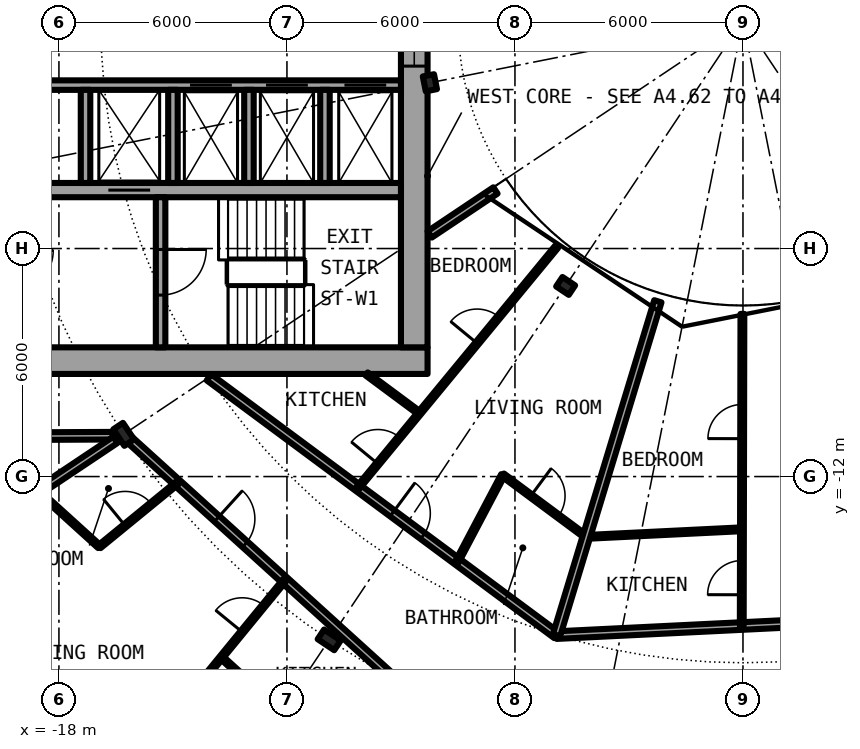
"""IFC4 building model, lengths in metres.
Left out: names, types, materials, properties, quantities, classifications, styles, units other than length and angle.
Written with IfcOpenShell. Run it as: python <this file> out.ifc"""

import sys

from ifc_helpers import new_model, si_unit, direction, frame, frame_2d, origin, origin_2d, place, context, subcontext, project, spatial, rectangle, i_section, extrude, element, fill, save


model = new_model("IFC4")
c1 = context("Model", 3, precision=1e-05, world=origin(), true_north=direction((0.0, 1.0)))
c2 = subcontext(c1, "Body", "Model", "MODEL_VIEW")
j1 = project(units=[si_unit("LENGTHUNIT", "METRE"), si_unit("PLANEANGLEUNIT", "RADIAN")], contexts=[c1])
p1 = place(None, origin())
s1 = spatial("IfcSite", under=j1, at=p1, CompositionType="ELEMENT")
p2 = place(p1, origin())
s2 = spatial("IfcBuilding", under=s1, at=p2, CompositionType="ELEMENT")
p3 = place(p2, frame((0.0, 0.0, 81.9)))
s3 = spatial("IfcBuildingStorey", under=s2, at=p3, CompositionType="ELEMENT", Elevation=81.9)
for number, where, z_axis, x_axis in (
    (1, (-16.297, -10.889, 0.0), (0.0, 0.0, 1.0), (-0.831, -0.556, 0.0)),
    (2, (-10.889, -16.297, 0.0), (0.0, 0.0, 1.0), (-0.556, -0.831, 0.0)),
):
    element("IfcColumn", number, at=place(p3, frame(where, z_axis=z_axis, x_axis=x_axis)), inside=s3, PredefinedType="COLUMN", context=c2, shape_type="SweptSolid", body=[
        extrude(i_section(OverallWidth=0.306, OverallDepth=0.524, WebThickness=0.021, FlangeThickness=0.04, FilletRadius=0.027, at=origin_2d()), origin(), (0.0, 0.0, 1.0), 3.05),
    ])
for number, where, z_axis, x_axis in (
    (3, (-8.239, -1.639, 0.0), (0.0, 0.0, 1.0), (-0.981, -0.195, 0.0)),
    (4, (-4.667, -6.984, 0.0), (0.0, 0.0, 1.0), (-0.556, -0.831, 0.0)),
):
    element("IfcColumn", number, at=place(p3, frame(where, z_axis=z_axis, x_axis=x_axis)), inside=s3, PredefinedType="COLUMN", context=c2, shape_type="SweptSolid", body=[
        extrude(i_section(OverallWidth=0.3, OverallDepth=0.4, WebThickness=0.013, FlangeThickness=0.024, FilletRadius=0.027, at=origin_2d()), origin(), (0.0, 0.0, 1.0), 3.05),
    ])
p4 = place(p3, frame((-22.3, -8.95, 0.0), z_axis=(0.0, 0.0, 1.0), x_axis=(1.0, 0.0, 0.0)))
e5 = element("IfcWall", 5, at=p4, inside=s3, PredefinedType="SHEAR", context=c2, shape_type="SweptSolid", body=[
    extrude(rectangle(XDim=14.0, YDim=0.7, at=frame_2d((7.0, 0.0))), origin(), (0.0, 0.0, 1.0), 3.05),
])
p5 = place(p4, frame((1.225, 0.0, 0.0)))
e6 = element("IfcOpeningElement", 6, at=p5, cuts=e5, PredefinedType="OPENING", context=c2, shape_type="SweptSolid", body=[
    extrude(rectangle(XDim=1.2, YDim=2.3, at=frame_2d((0.6, 1.15))), frame((0.0, 0.36, 0.0), z_axis=(0.0, -1.0, 0.0), x_axis=(1.0, 0.0, 0.0)), (0.0, 0.0, 1.0), 0.72),
])
p6 = place(p3, frame((-8.65, 8.6, 0.0), z_axis=(0.0, 0.0, 1.0), x_axis=(0.0, -1.0, 0.0)))
e7 = element("IfcWall", 7, at=p6, inside=s3, PredefinedType="SHEAR", context=c2, shape_type="SweptSolid", body=[
    extrude(rectangle(XDim=17.2, YDim=0.7, at=frame_2d((8.6, 0.0))), origin(), (0.0, 0.0, 1.0), 3.05),
])
p7 = place(p6, frame((7.4, 0.0, 0.1)))
e8 = element("IfcOpeningElement", 8, at=p7, cuts=e7, PredefinedType="OPENING", context=c2, shape_type="SweptSolid", body=[
    extrude(rectangle(XDim=2.4, YDim=2.2, at=frame_2d((1.2, 1.1))), frame((0.0, 0.36, 0.0), z_axis=(0.0, -1.0, 0.0), x_axis=(1.0, 0.0, 0.0)), (0.0, 0.0, 1.0), 0.72),
])
p8 = place(p3, frame((-9.0, -1.7, 0.0), z_axis=(0.0, 0.0, 1.0), x_axis=(-1.0, 0.0, 0.0)))
e9 = element("IfcWall", 9, at=p8, inside=s3, PredefinedType="SHEAR", context=c2, shape_type="SweptSolid", body=[
    extrude(rectangle(XDim=10.15, YDim=0.25, at=frame_2d((5.075, 0.0))), origin(), (0.0, 0.0, 1.0), 3.05),
])
p9 = place(p8, frame((0.387, 0.0, 0.0)))
e10 = element("IfcOpeningElement", 10, at=p9, cuts=e9, PredefinedType="OPENING", context=c2, shape_type="SweptSolid", body=[
    extrude(rectangle(XDim=1.1, YDim=2.3, at=frame_2d((0.55, 1.15))), frame((0.0, 0.135, 0.0), z_axis=(0.0, -1.0, 0.0), x_axis=(1.0, 0.0, 0.0)), (0.0, 0.0, 1.0), 0.27),
])
p10 = place(p8, frame((2.45, 0.0, 0.0)))
e11 = element("IfcOpeningElement", 11, at=p10, cuts=e9, PredefinedType="OPENING", context=c2, shape_type="SweptSolid", body=[
    extrude(rectangle(XDim=1.1, YDim=2.3, at=frame_2d((0.55, 1.15))), frame((0.0, 0.135, 0.0), z_axis=(0.0, -1.0, 0.0), x_axis=(1.0, 0.0, 0.0)), (0.0, 0.0, 1.0), 0.27),
])
p11 = place(p8, frame((4.45, 0.0, 0.0)))
e12 = element("IfcOpeningElement", 12, at=p11, cuts=e9, PredefinedType="OPENING", context=c2, shape_type="SweptSolid", body=[
    extrude(rectangle(XDim=1.1, YDim=2.3, at=frame_2d((0.55, 1.15))), frame((0.0, 0.135, 0.0), z_axis=(0.0, -1.0, 0.0), x_axis=(1.0, 0.0, 0.0)), (0.0, 0.0, 1.0), 0.27),
])
p12 = place(p3, frame((-9.0, -4.462, 0.0), z_axis=(0.0, 0.0, 1.0), x_axis=(-1.0, 0.0, 0.0)))
e13 = element("IfcWall", 13, at=p12, inside=s3, PredefinedType="SHEAR", context=c2, shape_type="SweptSolid", body=[
    extrude(rectangle(XDim=10.15, YDim=0.375, at=frame_2d((5.075, 0.0))), origin(), (0.0, 0.0, 1.0), 3.05),
])
p13 = place(p12, frame((6.6, 0.0, 0.0)))
e14 = element("IfcOpeningElement", 14, at=p13, cuts=e13, PredefinedType="OPENING", context=c2, shape_type="SweptSolid", body=[
    extrude(rectangle(XDim=1.1, YDim=2.3, at=frame_2d((0.55, 1.15))), frame((0.0, 0.198, 0.0), z_axis=(0.0, -1.0, 0.0), x_axis=(1.0, 0.0, 0.0)), (0.0, 0.0, 1.0), 0.395),
])
p14 = place(p3, frame((-15.325, -4.65, 0.0), z_axis=(0.0, 0.0, 1.0), x_axis=(0.0, -1.0, 0.0)))
e15 = element("IfcWall", 15, at=p14, inside=s3, PredefinedType="SHEAR", context=c2, shape_type="SweptSolid", body=[
    extrude(rectangle(XDim=3.95, YDim=0.25, at=frame_2d((1.975, 0.0))), origin(), (0.0, 0.0, 1.0), 3.05),
])
p15 = place(p14, frame((1.375, 0.0, 0.0)))
e16 = element("IfcOpeningElement", 16, at=p15, cuts=e15, PredefinedType="OPENING", context=c2, shape_type="SweptSolid", body=[
    extrude(rectangle(XDim=1.2, YDim=2.3, at=frame_2d((0.6, 1.15))), frame((0.0, 0.135, 0.0), z_axis=(0.0, -1.0, 0.0), x_axis=(1.0, 0.0, 0.0)), (0.0, 0.0, 1.0), 0.27),
])
for number, where, z_axis, x_axis in (
    (17, (-15.0, -1.825, 0.0), (0.0, 0.0, 1.0), (0.0, -1.0, 0.0)),
    (18, (-17.3, -1.825, 0.0), (0.0, 0.0, 1.0), (0.0, -1.0, 0.0)),
    (19, (-11.0, -1.825, 0.0), (0.0, 0.0, 1.0), (0.0, -1.0, 0.0)),
    (20, (-13.0, -1.825, 0.0), (0.0, 0.0, 1.0), (0.0, -1.0, 0.0)),
):
    element("IfcWall", number, at=place(p3, frame(where, z_axis=z_axis, x_axis=x_axis)), inside=s3, PredefinedType="SOLIDWALL", context=c2, shape_type="SweptSolid", body=[
        extrude(rectangle(XDim=2.45, YDim=0.25, at=frame_2d((1.225, 0.0))), origin(), (0.0, 0.0, 1.0), 2.7),
    ])
p16 = place(p3, frame((-18.542, -12.389, 0.0), z_axis=(0.0, 0.0, 1.0), x_axis=(0.740836325503, -0.671685595212, 0.0)))
e21 = element("IfcWall", 21, at=p16, inside=s3, PredefinedType="PARTITIONING", context=c2, shape_type="SweptSolid", body=[
    extrude(rectangle(XDim=2.168, YDim=0.1, at=frame_2d((1.084, 0.0))), origin(), (0.0, 0.0, 1.0), 2.7),
])
p17 = place(p3, frame((-13.727, -16.754, 0.0), z_axis=(0.0, 0.0, 1.0), x_axis=(0.740840803797, -0.671680655839, 0.0)))
e22 = element("IfcWall", 22, at=p17, inside=s3, PredefinedType="PARTITIONING", context=c2, shape_type="SweptSolid", body=[
    extrude(rectangle(XDim=4.338, YDim=0.1, at=frame_2d((2.169, 0.0))), origin(), (0.0, 0.0, 1.0), 2.7),
])
p18 = place(p3, frame((-16.179, -10.995, 0.0), z_axis=(0.0, 0.0, 1.0), x_axis=(0.740909940942, -0.671604392044, 0.0)))
e23 = element("IfcWall", 23, at=p18, inside=s3, PredefinedType="PARTITIONING", context=c2, shape_type="SweptSolid", body=[
    extrude(rectangle(XDim=9.367, YDim=0.2, at=frame_2d((4.683, 0.0))), origin(), (0.0, 0.0, 1.0), 2.38),
])
p19 = place(p18, frame((3.152, 0.0, 0.0)))
e24 = element("IfcOpeningElement", 24, at=p19, cuts=e23, PredefinedType="OPENING", context=c2, shape_type="SweptSolid", body=[
    extrude(rectangle(XDim=1.0, YDim=2.3, at=frame_2d((0.5, 1.15))), frame((0.0, 0.11, 0.0), z_axis=(0.0, -1.0, 0.0), x_axis=(1.0, 0.0, 0.0)), (0.0, 0.0, 1.0), 0.22),
])
p20 = place(p3, frame((-14.052, -9.389, 0.0), z_axis=(0.0, 0.0, 1.0), x_axis=(0.803204584823, -0.59570327758, 0.0)))
e25 = element("IfcWall", 25, at=p20, inside=s3, PredefinedType="PARTITIONING", context=c2, shape_type="SweptSolid", body=[
    extrude(rectangle(XDim=11.387, YDim=0.2, at=frame_2d((5.693, 0.0))), origin(), (0.0, 0.0, 1.0), 2.7),
])
p21 = place(p20, frame((6.007, 0.0, 0.0)))
e26 = element("IfcOpeningElement", 26, at=p21, cuts=e25, PredefinedType="OPENING", context=c2, shape_type="SweptSolid", body=[
    extrude(rectangle(XDim=1.0, YDim=2.3, at=frame_2d((0.5, 1.15))), frame((0.0, 0.11, 0.0), z_axis=(0.0, -1.0, 0.0), x_axis=(1.0, 0.0, 0.0)), (0.0, 0.0, 1.0), 0.22),
])
p22 = place(p3, frame((-4.906, -16.172, 0.0), z_axis=(0.0, 0.0, 1.0), x_axis=(0.998798520108, 0.049005267363, 0.0)))
e27 = element("IfcWall", 27, at=p22, inside=s3, PredefinedType="PARTITIONING", context=c2, shape_type="SweptSolid", body=[
    extrude(rectangle(XDim=11.389, YDim=0.2, at=frame_2d((5.694, 0.0))), origin(), (0.0, 0.0, 1.0), 2.7),
])
p23 = place(p22, frame((6.008, 0.0, 0.0)))
e28 = element("IfcOpeningElement", 28, at=p23, cuts=e27, PredefinedType="OPENING", context=c2, shape_type="SweptSolid", body=[
    extrude(rectangle(XDim=1.0, YDim=2.3, at=frame_2d((0.5, 1.15))), frame((0.0, 0.11, 0.0), z_axis=(0.0, -1.0, 0.0), x_axis=(1.0, 0.0, 0.0)), (0.0, 0.0, 1.0), 0.22),
])
p24 = place(p3, frame((-9.904, -9.3, 0.0), z_axis=(0.0, 0.0, 1.0), x_axis=(0.803135014325, -0.595797070121, 0.0)))
e29 = element("IfcWall", 29, at=p24, inside=s3, PredefinedType="PARTITIONING", context=c2, shape_type="SweptSolid", body=[
    extrude(rectangle(XDim=1.732, YDim=0.1, at=frame_2d((0.866, 0.0))), origin(), (0.0, 0.0, 1.0), 2.7),
])
p25 = place(p3, frame((-6.319, -11.96, 0.0), z_axis=(0.0, 0.0, 1.0), x_axis=(0.803128348509, -0.595806055542, 0.0)))
e30 = element("IfcWall", 30, at=p25, inside=s3, PredefinedType="PARTITIONING", context=c2, shape_type="SweptSolid", body=[
    extrude(rectangle(XDim=2.734, YDim=0.1, at=frame_2d((1.367, 0.0))), origin(), (0.0, 0.0, 1.0), 2.7),
])
p26 = place(p25, frame((0.918, 0.0, 0.0)))
e31 = element("IfcOpeningElement", 31, at=p26, cuts=e30, PredefinedType="OPENING", context=c2, shape_type="SweptSolid", body=[
    extrude(rectangle(XDim=0.9, YDim=2.3, at=frame_2d((0.45, 1.15))), frame((0.0, 0.06, 0.0), z_axis=(0.0, -1.0, 0.0), x_axis=(1.0, 0.0, 0.0)), (0.0, 0.0, 1.0), 0.12),
])
p27 = place(p3, frame((-4.125, -13.588, 0.0), z_axis=(0.0, 0.0, 1.0), x_axis=(0.998798386358, 0.049007993321, 0.0)))
e32 = element("IfcWall", 32, at=p27, inside=s3, PredefinedType="PARTITIONING", context=c2, shape_type="SweptSolid", body=[
    extrude(rectangle(XDim=4.1, YDim=0.1, at=frame_2d((2.05, 0.0))), origin(), (0.0, 0.0, 1.0), 2.7),
])
p28 = place(p3, frame((-21.675, -10.95, 0.0), z_axis=(0.0, 0.0, 1.0), x_axis=(0.999988019025, 0.004895079807, 0.0)))
e33 = element("IfcWall", 33, at=p28, inside=s3, PredefinedType="PARTITIONING", context=c2, shape_type="SweptSolid", body=[
    extrude(rectangle(XDim=5.087, YDim=0.2, at=frame_2d((2.543, 0.0))), origin(), (0.0, 0.0, 1.0), 2.7),
])
p29 = place(p28, frame((2.163, 0.0, 0.0)))
e34 = element("IfcOpeningElement", 34, at=p29, cuts=e33, PredefinedType="OPENING", context=c2, shape_type="SweptSolid", body=[
    extrude(rectangle(XDim=1.0, YDim=2.3, at=frame_2d((0.5, 1.15))), frame((0.0, 0.11, 0.0), z_axis=(0.0, -1.0, 0.0), x_axis=(1.0, 0.0, 0.0)), (0.0, 0.0, 1.0), 0.22),
])
p30 = place(p3, frame((-6.513, -4.472, 0.0), z_axis=(0.0, 0.0, 1.0), x_axis=(-0.831382204863, -0.555701025225, 0.0)))
e35 = element("IfcWall", 35, at=p30, inside=s3, PredefinedType="PARTITIONING", context=c2, shape_type="SweptSolid", body=[
    extrude(rectangle(XDim=2.082, YDim=0.2, at=frame_2d((1.041, 0.0))), origin(), (0.0, 0.0, 1.0), 2.7),
])
p31 = place(p3, frame((-22.595, -15.097, 0.0), z_axis=(0.0, 0.0, 1.0), x_axis=(0.831505405283, 0.555516661303, 0.0)))
e36 = element("IfcWall", 36, at=p31, inside=s3, PredefinedType="PARTITIONING", context=c2, shape_type="SweptSolid", body=[
    extrude(rectangle(XDim=7.312, YDim=0.2, at=frame_2d((3.656, 0.0))), origin(), (0.0, 0.0, 1.0), 2.7),
])
p32 = place(p3, frame((-17.219, -21.023, 0.0), z_axis=(0.0, 0.0, 1.0), x_axis=(0.633664062855, 0.773608334654, 0.0)))
e37 = element("IfcWall", 37, at=p32, inside=s3, PredefinedType="PARTITIONING", context=c2, shape_type="SweptSolid", body=[
    extrude(rectangle(XDim=8.138, YDim=0.1, at=frame_2d((4.069, 0.0))), origin(), (0.0, 0.0, 1.0), 2.7),
])
p33 = place(p32, frame((6.377, 0.0, 0.0)))
e38 = element("IfcOpeningElement", 38, at=p33, cuts=e37, PredefinedType="OPENING", context=c2, shape_type="SweptSolid", body=[
    extrude(rectangle(XDim=0.9, YDim=2.3, at=frame_2d((0.45, 1.15))), frame((0.0, 0.06, 0.0), z_axis=(0.0, -1.0, 0.0), x_axis=(1.0, 0.0, 0.0)), (0.0, 0.0, 1.0), 0.12),
])
p34 = place(p32, frame((2.308, 0.0, 0.0)))
e39 = element("IfcOpeningElement", 39, at=p34, cuts=e37, PredefinedType="OPENING", context=c2, shape_type="SweptSolid", body=[
    extrude(rectangle(XDim=0.9, YDim=2.3, at=frame_2d((0.45, 1.15))), frame((0.0, 0.06, 0.0), z_axis=(0.0, -1.0, 0.0), x_axis=(1.0, 0.0, 0.0)), (0.0, 0.0, 1.0), 0.12),
])
p35 = place(p3, frame((-16.936, -13.845, 0.0), z_axis=(0.0, 0.0, 1.0), x_axis=(0.774162545943, 0.632986850147, 0.0)))
e40 = element("IfcWall", 40, at=p35, inside=s3, PredefinedType="PARTITIONING", context=c2, shape_type="SweptSolid", body=[
    extrude(rectangle(XDim=2.649, YDim=0.1, at=frame_2d((1.325, 0.0))), origin(), (0.0, 0.0, 1.0), 2.7),
])
p36 = place(p35, frame((0.875, 0.0, 0.0)))
e41 = element("IfcOpeningElement", 41, at=p36, cuts=e40, PredefinedType="OPENING", context=c2, shape_type="SweptSolid", body=[
    extrude(rectangle(XDim=0.9, YDim=2.3, at=frame_2d((0.45, 1.15))), frame((0.0, 0.06, 0.0), z_axis=(0.0, -1.0, 0.0), x_axis=(1.0, 0.0, 0.0)), (0.0, 0.0, 1.0), 0.12),
])
p37 = place(p3, frame((-10.132, -12.296, 0.0), z_axis=(0.0, 0.0, 1.0), x_axis=(0.636105207978, 0.771602335652, 0.0)))
e42 = element("IfcWall", 42, at=p37, inside=s3, PredefinedType="PARTITIONING", context=c2, shape_type="SweptSolid", body=[
    extrude(rectangle(XDim=8.213, YDim=0.1, at=frame_2d((4.106, 0.0))), origin(), (0.0, 0.0, 1.0), 2.7),
])
p38 = place(p37, frame((0.821, 0.0, 0.0)))
e43 = element("IfcOpeningElement", 43, at=p38, cuts=e42, PredefinedType="OPENING", context=c2, shape_type="SweptSolid", body=[
    extrude(rectangle(XDim=0.9, YDim=2.3, at=frame_2d((0.45, 1.15))), frame((0.0, 0.06, 0.0), z_axis=(0.0, -1.0, 0.0), x_axis=(1.0, 0.0, 0.0)), (0.0, 0.0, 1.0), 0.12),
])
p39 = place(p37, frame((4.929, 0.0, 0.0)))
e44 = element("IfcOpeningElement", 44, at=p39, cuts=e42, PredefinedType="OPENING", context=c2, shape_type="SweptSolid", body=[
    extrude(rectangle(XDim=0.9, YDim=2.3, at=frame_2d((0.45, 1.15))), frame((0.0, 0.06, 0.0), z_axis=(0.0, -1.0, 0.0), x_axis=(1.0, 0.0, 0.0)), (0.0, 0.0, 1.0), 0.12),
])
p40 = place(p3, frame((-7.519, -14.234, 0.0), z_axis=(0.0, 0.0, 1.0), x_axis=(0.467001992543, 0.884256263173, 0.0)))
e45 = element("IfcWall", 45, at=p40, inside=s3, PredefinedType="PARTITIONING", context=c2, shape_type="SweptSolid", body=[
    extrude(rectangle(XDim=2.572, YDim=0.1, at=frame_2d((1.286, 0.0))), origin(), (0.0, 0.0, 1.0), 2.7),
])
p41 = place(p3, frame((-4.906, -16.172, 0.0), z_axis=(0.0, 0.0, 1.0), x_axis=(0.290420725025, 0.956899055531, 0.0)))
e46 = element("IfcWall", 46, at=p41, inside=s3, PredefinedType="PARTITIONING", context=c2, shape_type="SweptSolid", body=[
    extrude(rectangle(XDim=9.18, YDim=0.2, at=frame_2d((4.59, 0.0))), origin(), (0.0, 0.0, 1.0), 2.7),
])
p42 = place(p3, frame((-0.032, -15.933, 0.0), z_axis=(0.0, 0.0, 1.0), x_axis=(0.002080789764, 0.999997835155, 0.0)))
e47 = element("IfcWall", 47, at=p42, inside=s3, PredefinedType="PARTITIONING", context=c2, shape_type="SweptSolid", body=[
    extrude(rectangle(XDim=8.213, YDim=0.1, at=frame_2d((4.106, 0.0))), origin(), (0.0, 0.0, 1.0), 2.7),
])
p43 = place(p42, frame((0.823, 0.0, 0.0)))
e48 = element("IfcOpeningElement", 48, at=p43, cuts=e47, PredefinedType="OPENING", context=c2, shape_type="SweptSolid", body=[
    extrude(rectangle(XDim=0.9, YDim=2.3, at=frame_2d((0.45, 1.15))), frame((0.0, 0.06, 0.0), z_axis=(0.0, -1.0, 0.0), x_axis=(1.0, 0.0, 0.0)), (0.0, 0.0, 1.0), 0.12),
])
p44 = place(p42, frame((4.93, 0.0, 0.0)))
e49 = element("IfcOpeningElement", 49, at=p44, cuts=e47, PredefinedType="OPENING", context=c2, shape_type="SweptSolid", body=[
    extrude(rectangle(XDim=0.9, YDim=2.3, at=frame_2d((0.45, 1.15))), frame((0.0, 0.06, 0.0), z_axis=(0.0, -1.0, 0.0), x_axis=(1.0, 0.0, 0.0)), (0.0, 0.0, 1.0), 0.12),
])
p45 = place(p9, origin())
e50 = element("IfcDoor", 50, at=p45, inside=s3, OperationType="DOUBLE_DOOR_SLIDING", PredefinedType="DOOR", context=c2, shape_type="SweptSolid", body=[
    extrude(rectangle(XDim=1.1, YDim=2.3, at=frame_2d((0.55, 1.15))), frame((0.0, 0.025, 0.0), z_axis=(0.0, -1.0, 0.0), x_axis=(1.0, 0.0, 0.0)), (0.0, 0.0, 1.0), 0.05),
])
fill(e10, e50)
p46 = place(p10, origin())
e51 = element("IfcDoor", 51, at=p46, inside=s3, OperationType="DOUBLE_DOOR_SLIDING", PredefinedType="DOOR", context=c2, shape_type="SweptSolid", body=[
    extrude(rectangle(XDim=1.1, YDim=2.3, at=frame_2d((0.55, 1.15))), frame((0.0, 0.025, 0.0), z_axis=(0.0, -1.0, 0.0), x_axis=(1.0, 0.0, 0.0)), (0.0, 0.0, 1.0), 0.05),
])
fill(e11, e51)
p47 = place(p11, origin())
e52 = element("IfcDoor", 52, at=p47, inside=s3, OperationType="DOUBLE_DOOR_SLIDING", PredefinedType="DOOR", context=c2, shape_type="SweptSolid", body=[
    extrude(rectangle(XDim=1.1, YDim=2.3, at=frame_2d((0.55, 1.15))), frame((0.0, 0.025, 0.0), z_axis=(0.0, -1.0, 0.0), x_axis=(1.0, 0.0, 0.0)), (0.0, 0.0, 1.0), 0.05),
])
fill(e12, e52)
p48 = place(p13, origin())
e53 = element("IfcDoor", 53, at=p48, inside=s3, OperationType="DOUBLE_DOOR_SLIDING", PredefinedType="DOOR", context=c2, shape_type="SweptSolid", body=[
    extrude(rectangle(XDim=1.1, YDim=2.3, at=frame_2d((0.55, 1.15))), frame((0.0, 0.025, 0.0), z_axis=(0.0, -1.0, 0.0), x_axis=(1.0, 0.0, 0.0)), (0.0, 0.0, 1.0), 0.05),
])
fill(e14, e53)
p49 = place(p15, origin())
e54 = element("IfcDoor", 54, at=p49, inside=s3, OperationType="SINGLE_SWING_LEFT", PredefinedType="DOOR", context=c2, shape_type="SweptSolid", body=[
    extrude(rectangle(XDim=1.2, YDim=2.3, at=frame_2d((0.6, 1.15))), frame((0.0, 0.025, 0.0), z_axis=(0.0, -1.0, 0.0), x_axis=(1.0, 0.0, 0.0)), (0.0, 0.0, 1.0), 0.05),
])
fill(e16, e54)
p50 = place(p7, origin())
e55 = element("IfcWindow", 55, at=p50, inside=s3, PartitioningType="SINGLE_PANEL", PredefinedType="WINDOW", context=c2, shape_type="SweptSolid", body=[
    extrude(rectangle(XDim=2.4, YDim=2.2, at=frame_2d((1.2, 1.1))), frame((0.0, 0.03, 0.0), z_axis=(0.0, -1.0, 0.0), x_axis=(1.0, 0.0, 0.0)), (0.0, 0.0, 1.0), 0.06),
])
fill(e8, e55)
p51 = place(p19, origin())
e56 = element("IfcDoor", 56, at=p51, inside=s3, OperationType="SINGLE_SWING_LEFT", PredefinedType="DOOR", context=c2, shape_type="SweptSolid", body=[
    extrude(rectangle(XDim=1.0, YDim=2.3, at=frame_2d((0.5, 1.15))), frame((0.0, 0.025, 0.0), z_axis=(0.0, -1.0, 0.0), x_axis=(1.0, 0.0, 0.0)), (0.0, 0.0, 1.0), 0.05),
])
fill(e24, e56)
p52 = place(p36, origin())
e57 = element("IfcDoor", 57, at=p52, inside=s3, OperationType="SINGLE_SWING_LEFT", PredefinedType="DOOR", context=c2, shape_type="SweptSolid", body=[
    extrude(rectangle(XDim=0.9, YDim=2.3, at=frame_2d((0.45, 1.15))), frame((0.0, 0.025, 0.0), z_axis=(0.0, -1.0, 0.0), x_axis=(1.0, 0.0, 0.0)), (0.0, 0.0, 1.0), 0.05),
])
fill(e41, e57)
p53 = place(p33, origin())
e58 = element("IfcDoor", 58, at=p53, inside=s3, OperationType="SINGLE_SWING_RIGHT", PredefinedType="DOOR", context=c2, shape_type="SweptSolid", body=[
    extrude(rectangle(XDim=0.9, YDim=2.3, at=frame_2d((0.45, 1.15))), frame((0.0, 0.025, 0.0), z_axis=(0.0, -1.0, 0.0), x_axis=(1.0, 0.0, 0.0)), (0.0, 0.0, 1.0), 0.05),
])
fill(e38, e58)
p54 = place(p21, origin())
e59 = element("IfcDoor", 59, at=p54, inside=s3, OperationType="SINGLE_SWING_RIGHT", PredefinedType="DOOR", context=c2, shape_type="SweptSolid", body=[
    extrude(rectangle(XDim=1.0, YDim=2.3, at=frame_2d((0.5, 1.15))), frame((0.0, 0.025, 0.0), z_axis=(0.0, -1.0, 0.0), x_axis=(1.0, 0.0, 0.0)), (0.0, 0.0, 1.0), 0.05),
])
fill(e26, e59)
p55 = place(p26, origin())
e60 = element("IfcDoor", 60, at=p55, inside=s3, OperationType="SINGLE_SWING_RIGHT", PredefinedType="DOOR", context=c2, shape_type="SweptSolid", body=[
    extrude(rectangle(XDim=0.9, YDim=2.3, at=frame_2d((0.45, 1.15))), frame((0.0, 0.025, 0.0), z_axis=(0.0, -1.0, 0.0), x_axis=(1.0, 0.0, 0.0)), (0.0, 0.0, 1.0), 0.05),
])
fill(e31, e60)
p56 = place(p38, origin())
e61 = element("IfcDoor", 61, at=p56, inside=s3, OperationType="SINGLE_SWING_LEFT", PredefinedType="DOOR", context=c2, shape_type="SweptSolid", body=[
    extrude(rectangle(XDim=0.9, YDim=2.3, at=frame_2d((0.45, 1.15))), frame((0.0, 0.025, 0.0), z_axis=(0.0, -1.0, 0.0), x_axis=(1.0, 0.0, 0.0)), (0.0, 0.0, 1.0), 0.05),
])
fill(e43, e61)
p57 = place(p39, origin())
e62 = element("IfcDoor", 62, at=p57, inside=s3, OperationType="SINGLE_SWING_RIGHT", PredefinedType="DOOR", context=c2, shape_type="SweptSolid", body=[
    extrude(rectangle(XDim=0.9, YDim=2.3, at=frame_2d((0.45, 1.15))), frame((0.0, 0.025, 0.0), z_axis=(0.0, -1.0, 0.0), x_axis=(1.0, 0.0, 0.0)), (0.0, 0.0, 1.0), 0.05),
])
fill(e44, e62)
p58 = place(p43, origin())
e63 = element("IfcDoor", 63, at=p58, inside=s3, OperationType="SINGLE_SWING_LEFT", PredefinedType="DOOR", context=c2, shape_type="SweptSolid", body=[
    extrude(rectangle(XDim=0.9, YDim=2.3, at=frame_2d((0.45, 1.15))), frame((0.0, 0.025, 0.0), z_axis=(0.0, -1.0, 0.0), x_axis=(1.0, 0.0, 0.0)), (0.0, 0.0, 1.0), 0.05),
])
fill(e48, e63)
p59 = place(p44, origin())
e64 = element("IfcDoor", 64, at=p59, inside=s3, OperationType="SINGLE_SWING_RIGHT", PredefinedType="DOOR", context=c2, shape_type="SweptSolid", body=[
    extrude(rectangle(XDim=0.9, YDim=2.3, at=frame_2d((0.45, 1.15))), frame((0.0, 0.025, 0.0), z_axis=(0.0, -1.0, 0.0), x_axis=(1.0, 0.0, 0.0)), (0.0, 0.0, 1.0), 0.05),
])
fill(e49, e64)
save(model, sys.argv[1])
